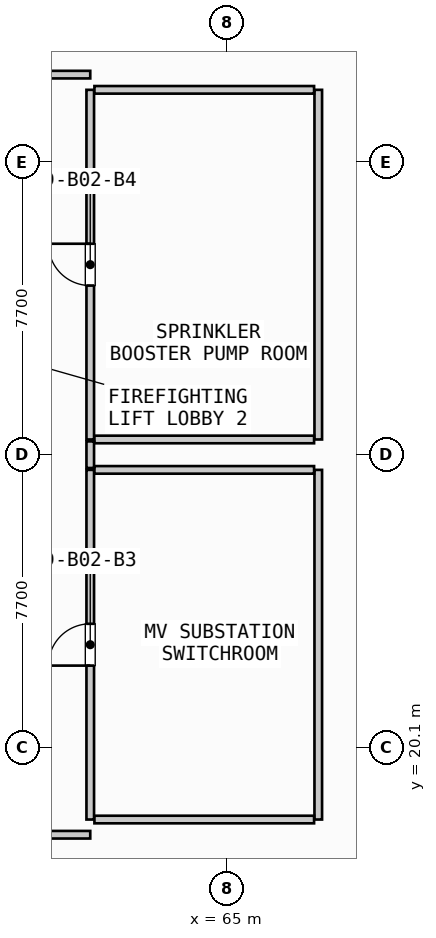
"""IFC4 building model, lengths in metres.
Left out: names, types, materials, properties, quantities, classifications, styles, units other than length and angle.
Written with IfcOpenShell. Run it as: python <this file> out.ifc"""

import sys

from ifc_helpers import new_model, si_unit, direction, frame, frame_2d, origin, place, context, subcontext, project, spatial, rectangle, extrude, source, transform, mapped, element, fill, save


model = new_model("IFC4")
c1 = context("Model", 3, precision=1e-05, world=origin(), true_north=direction((0.0, 1.0)))
c2 = subcontext(c1, "Body", "Model", "MODEL_VIEW")
j1 = project(units=[si_unit("LENGTHUNIT", "METRE"), si_unit("PLANEANGLEUNIT", "RADIAN")], contexts=[c1])
p1 = place(None, origin())
s1 = spatial("IfcSite", under=j1, at=p1, CompositionType="ELEMENT")
p2 = place(p1, origin())
s2 = spatial("IfcBuilding", under=s1, at=p2, CompositionType="ELEMENT")
p3 = place(p2, frame((0.0, 0.0, -9.0)))
s3 = spatial("IfcBuildingStorey", under=s2, at=p3, CompositionType="ELEMENT", Elevation=-9.0)
p4 = place(p3, frame((61.4, 18.2, 0.0), z_axis=(0.0, 0.0, 1.0), x_axis=(0.0, 1.0, 0.0)))
e1 = element("IfcWall", 1, at=p4, inside=s3, PredefinedType="PARTITIONING", context=c2, shape_type="SweptSolid", body=[
    extrude(rectangle(XDim=9.2, YDim=0.2, at=frame_2d((4.6, 0.0))), origin(), (0.0, 0.0, 1.0), 3.433),
])
p5 = place(p4, frame((4.05, 0.0, 0.0)))
e2 = element("IfcOpeningElement", 2, at=p5, cuts=e1, PredefinedType="OPENING", context=c2, shape_type="SweptSolid", body=[
    extrude(rectangle(XDim=1.1, YDim=2.15, at=frame_2d((0.55, 1.075))), frame((0.0, 0.11, 0.0), z_axis=(0.0, -1.0, 0.0), x_axis=(1.0, 0.0, 0.0)), (0.0, 0.0, 1.0), 0.22),
])
p6 = place(p3, frame((67.4, 18.2, 0.0), z_axis=(0.0, 0.0, 1.0), x_axis=(0.0, 1.0, 0.0)))
e3 = element("IfcWall", 3, at=p6, inside=s3, PredefinedType="PARTITIONING", context=c2, shape_type="SweptSolid", body=[
    extrude(rectangle(XDim=9.2, YDim=0.2, at=frame_2d((4.6, 0.0))), origin(), (0.0, 0.0, 1.0), 3.433),
])
for number, where, z_axis, x_axis in (
    (4, (61.51, 18.2, 0.0), (0.0, 0.0, 1.0), (1.0, 0.0, 0.0)),
    (5, (61.51, 27.4, 0.0), (0.0, 0.0, 1.0), (1.0, 0.0, 0.0)),
):
    element("IfcWall", number, at=place(p3, frame(where, z_axis=z_axis, x_axis=x_axis)), inside=s3, PredefinedType="PARTITIONING", context=c2, shape_type="SweptSolid", body=[
        extrude(rectangle(XDim=5.78, YDim=0.2, at=frame_2d((2.89, 0.0))), origin(), (0.0, 0.0, 1.0), 3.433),
    ])
p7 = place(p3, frame((61.4, 28.2, 0.0), z_axis=(0.0, 0.0, 1.0), x_axis=(0.0, 1.0, 0.0)))
e6 = element("IfcWall", 6, at=p7, inside=s3, PredefinedType="PARTITIONING", context=c2, shape_type="SweptSolid", body=[
    extrude(rectangle(XDim=9.2, YDim=0.2, at=frame_2d((4.6, 0.0))), origin(), (0.0, 0.0, 1.0), 3.433),
])
p8 = place(p7, frame((4.05, 0.0, 0.0)))
e7 = element("IfcOpeningElement", 7, at=p8, cuts=e6, PredefinedType="OPENING", context=c2, shape_type="SweptSolid", body=[
    extrude(rectangle(XDim=1.1, YDim=2.15, at=frame_2d((0.55, 1.075))), frame((0.0, 0.11, 0.0), z_axis=(0.0, -1.0, 0.0), x_axis=(1.0, 0.0, 0.0)), (0.0, 0.0, 1.0), 0.22),
])
p9 = place(p3, frame((67.4, 28.2, 0.0), z_axis=(0.0, 0.0, 1.0), x_axis=(0.0, 1.0, 0.0)))
e8 = element("IfcWall", 8, at=p9, inside=s3, PredefinedType="PARTITIONING", context=c2, shape_type="SweptSolid", body=[
    extrude(rectangle(XDim=9.2, YDim=0.2, at=frame_2d((4.6, 0.0))), origin(), (0.0, 0.0, 1.0), 3.433),
])
for number, where, z_axis, x_axis in (
    (9, (61.51, 28.2, 0.0), (0.0, 0.0, 1.0), (1.0, 0.0, 0.0)),
    (10, (61.51, 37.4, 0.0), (0.0, 0.0, 1.0), (1.0, 0.0, 0.0)),
):
    element("IfcWall", number, at=place(p3, frame(where, z_axis=z_axis, x_axis=x_axis)), inside=s3, PredefinedType="PARTITIONING", context=c2, shape_type="SweptSolid", body=[
        extrude(rectangle(XDim=5.78, YDim=0.2, at=frame_2d((2.89, 0.0))), origin(), (0.0, 0.0, 1.0), 3.433),
    ])
p10 = place(p3, frame((61.4, 27.45, 0.0), z_axis=(0.0, 0.0, 1.0), x_axis=(0.0, 1.0, 0.0)))
e11 = element("IfcWall", 11, at=p10, inside=s3, PredefinedType="PARTITIONING", context=c2, shape_type="SweptSolid", body=[
    extrude(rectangle(XDim=0.7, YDim=0.2, at=frame_2d((0.35, 0.0))), origin(), (0.0, 0.0, 1.0), 3.433),
])
p11 = place(p3, frame((32.2, 17.8, 0.0), z_axis=(0.0, 0.0, 1.0), x_axis=(1.0, 0.0, 0.0)))
e12 = element("IfcWall", 12, at=p11, inside=s3, PredefinedType="PARTITIONING", context=c2, shape_type="SweptSolid", body=[
    extrude(rectangle(XDim=29.2, YDim=0.2, at=frame_2d((14.6, 0.0))), origin(), (0.0, 0.0, 1.0), 3.433),
])
p12 = place(p11, frame((13.85, 0.0, 0.0)))
e13 = element("IfcOpeningElement", 13, at=p12, cuts=e12, PredefinedType="OPENING", context=c2, shape_type="SweptSolid", body=[
    extrude(rectangle(XDim=1.5, YDim=2.2, at=frame_2d((0.75, 1.1))), frame((0.0, 0.11, 0.0), z_axis=(0.0, -1.0, 0.0), x_axis=(1.0, 0.0, 0.0)), (0.0, 0.0, 1.0), 0.22),
])
p13 = place(p3, frame((32.2, 37.8, 0.0), z_axis=(0.0, 0.0, 1.0), x_axis=(1.0, 0.0, 0.0)))
e14 = element("IfcWall", 14, at=p13, inside=s3, PredefinedType="PARTITIONING", context=c2, shape_type="SweptSolid", body=[
    extrude(rectangle(XDim=29.2, YDim=0.2, at=frame_2d((14.6, 0.0))), origin(), (0.0, 0.0, 1.0), 3.433),
])
p14 = place(p13, frame((13.85, 0.0, 0.0)))
e15 = element("IfcOpeningElement", 15, at=p14, cuts=e14, PredefinedType="OPENING", context=c2, shape_type="SweptSolid", body=[
    extrude(rectangle(XDim=1.5, YDim=2.2, at=frame_2d((0.75, 1.1))), frame((0.0, 0.11, 0.0), z_axis=(0.0, -1.0, 0.0), x_axis=(1.0, 0.0, 0.0)), (0.0, 0.0, 1.0), 0.22),
])
m1 = source(origin(), c2, "Body", "SweptSolid", [
    extrude(rectangle(XDim=1.1, YDim=2.15, at=frame_2d((0.55, 1.075))), frame((0.0, 0.025, 0.0), z_axis=(0.0, -1.0, 0.0), x_axis=(1.0, 0.0, 0.0)), (0.0, 0.0, 1.0), 0.05),
])
p15 = place(p5, origin())
e16 = element("IfcDoor", 16, at=p15, inside=s3, OperationType="SINGLE_SWING_LEFT", PredefinedType="DOOR", context=c2, shape_type="MappedRepresentation", body=[
    mapped(m1, transform((0.0, 0.0, 0.0), scale=1.0)),
])
fill(e2, e16)
p16 = place(p8, origin())
e17 = element("IfcDoor", 17, at=p16, inside=s3, OperationType="SINGLE_SWING_RIGHT", PredefinedType="DOOR", context=c2, shape_type="MappedRepresentation", body=[
    mapped(m1, transform((0.0, 0.0, 0.0), scale=1.0)),
])
fill(e7, e17)
save(model, sys.argv[1])
